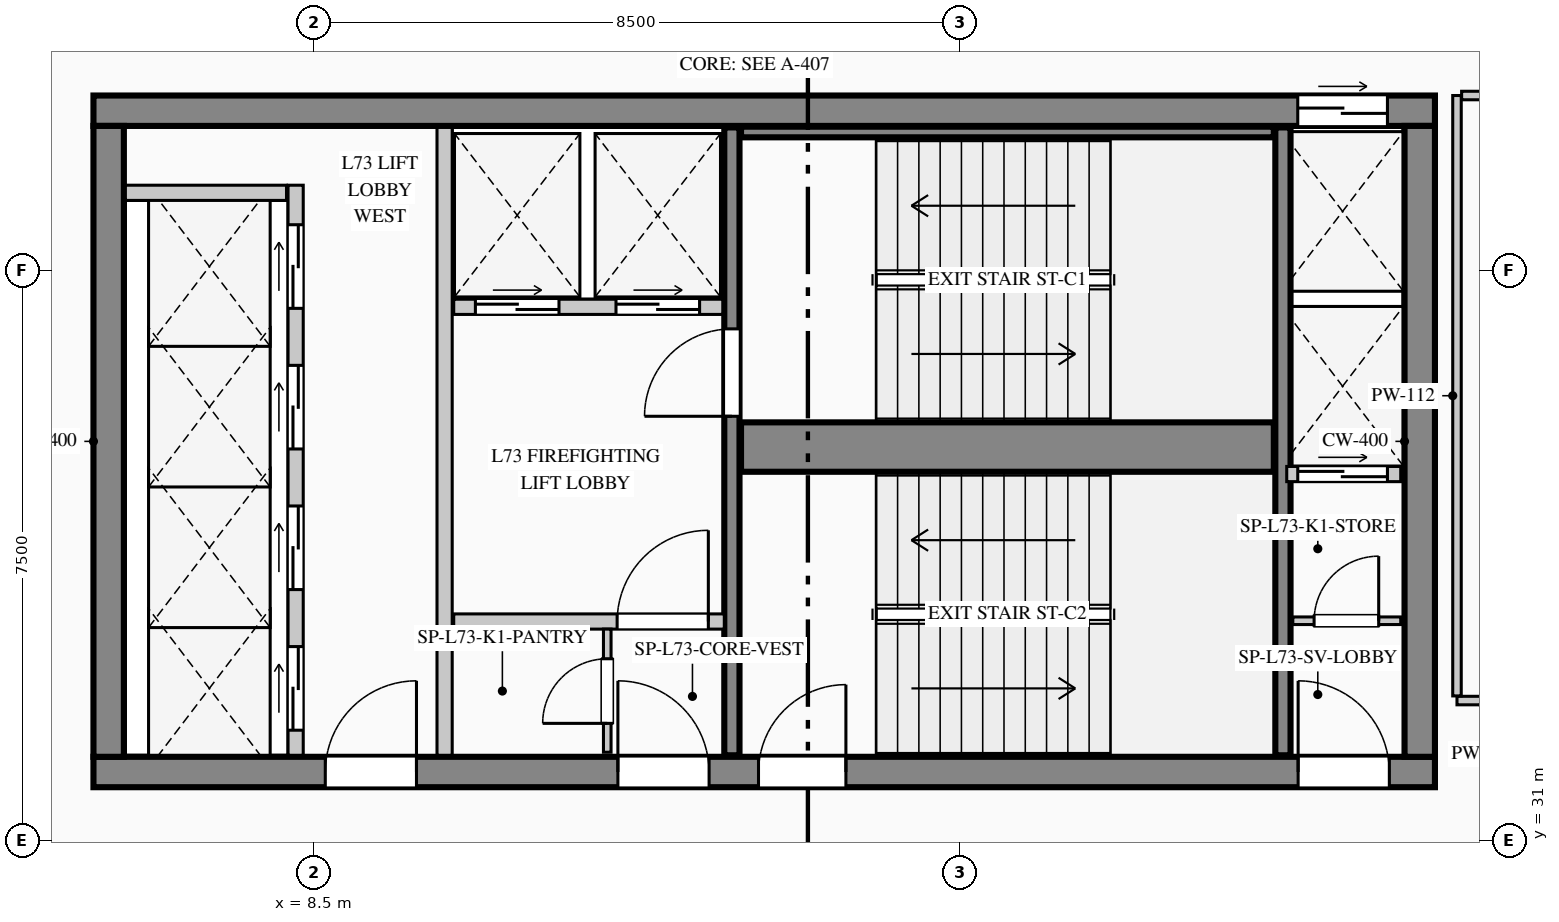
"""IFC4 building model, lengths in metres.
Left out: names, types, materials, properties, quantities, classifications, styles, units other than length and angle.
Written with IfcOpenShell. Run it as: python <this file> out.ifc"""

import sys

from ifc_helpers import new_model, si_unit, direction, frame, frame_2d, origin, place, context, subcontext, project, spatial, rectangle, extrude, element, fill, save


model = new_model("IFC4")
c1 = context("Model", 3, precision=1e-05, world=origin(), true_north=direction((0.0, 1.0)))
c2 = subcontext(c1, "Body", "Model", "MODEL_VIEW")
j1 = project(units=[si_unit("LENGTHUNIT", "METRE"), si_unit("PLANEANGLEUNIT", "RADIAN")], contexts=[c1])
p1 = place(None, origin())
s1 = spatial("IfcSite", under=j1, at=p1, CompositionType="ELEMENT")
p2 = place(p1, origin())
s2 = spatial("IfcBuilding", under=s1, at=p2, CompositionType="ELEMENT")
p3 = place(p2, frame((0.0, 0.0, 304.1)))
s3 = spatial("IfcBuildingStorey", under=s2, at=p3, CompositionType="ELEMENT", Elevation=304.1)
p4 = place(p3, frame((5.6, 40.6, 0.0), z_axis=(0.0, 0.0, 1.0), x_axis=(1.0, 0.0, 0.0)))
e1 = element("IfcWall", 1, at=p4, inside=s3, PredefinedType="SHEAR", context=c2, shape_type="SweptSolid", body=[
    extrude(rectangle(XDim=17.65, YDim=0.4, at=frame_2d((8.825, 0.0))), origin(), (0.0, 0.0, 1.0), 3.95),
])
p5 = place(p4, frame((15.845, 0.0, 0.0)))
e2 = element("IfcOpeningElement", 2, at=p5, cuts=e1, PredefinedType="OPENING", context=c2, shape_type="SweptSolid", body=[
    extrude(rectangle(XDim=1.18, YDim=2.25, at=frame_2d((0.59, 1.125))), frame((0.0, 0.21, 0.0), z_axis=(0.0, -1.0, 0.0), x_axis=(1.0, 0.0, 0.0)), (0.0, 0.0, 1.0), 0.42),
])
p6 = place(p3, frame((5.6, 31.9, 0.0), z_axis=(0.0, 0.0, 1.0), x_axis=(1.0, 0.0, 0.0)))
e3 = element("IfcWall", 3, at=p6, inside=s3, PredefinedType="SHEAR", context=c2, shape_type="SweptSolid", body=[
    extrude(rectangle(XDim=17.65, YDim=0.4, at=frame_2d((8.825, 0.0))), origin(), (0.0, 0.0, 1.0), 3.95),
])
p7 = place(p6, frame((3.05, 0.0, 0.0)))
e4 = element("IfcOpeningElement", 4, at=p7, cuts=e3, PredefinedType="OPENING", context=c2, shape_type="SweptSolid", body=[
    extrude(rectangle(XDim=1.2, YDim=2.2, at=frame_2d((0.6, 1.1))), frame((0.0, 0.21, 0.0), z_axis=(0.0, -1.0, 0.0), x_axis=(1.0, 0.0, 0.0)), (0.0, 0.0, 1.0), 0.42),
])
p8 = place(p6, frame((6.9, 0.0, 0.0)))
e5 = element("IfcOpeningElement", 5, at=p8, cuts=e3, PredefinedType="OPENING", context=c2, shape_type="SweptSolid", body=[
    extrude(rectangle(XDim=1.2, YDim=2.2, at=frame_2d((0.6, 1.1))), frame((0.0, 0.21, 0.0), z_axis=(0.0, -1.0, 0.0), x_axis=(1.0, 0.0, 0.0)), (0.0, 0.0, 1.0), 0.42),
])
p9 = place(p6, frame((8.75, 0.0, 0.0)))
e6 = element("IfcOpeningElement", 6, at=p9, cuts=e3, PredefinedType="OPENING", context=c2, shape_type="SweptSolid", body=[
    extrude(rectangle(XDim=1.15, YDim=2.2, at=frame_2d((0.575, 1.1))), frame((0.0, 0.21, 0.0), z_axis=(0.0, -1.0, 0.0), x_axis=(1.0, 0.0, 0.0)), (0.0, 0.0, 1.0), 0.42),
])
p10 = place(p6, frame((15.85, 0.0, 0.0)))
e7 = element("IfcOpeningElement", 7, at=p10, cuts=e3, PredefinedType="OPENING", context=c2, shape_type="SweptSolid", body=[
    extrude(rectangle(XDim=1.2, YDim=2.2, at=frame_2d((0.6, 1.1))), frame((0.0, 0.21, 0.0), z_axis=(0.0, -1.0, 0.0), x_axis=(1.0, 0.0, 0.0)), (0.0, 0.0, 1.0), 0.42),
])
for number, where, z_axis, x_axis in (
    (8, (5.8, 32.1, 0.0), (0.0, 0.0, 1.0), (0.0, 1.0, 0.0)),
    (9, (23.05, 32.1, 0.0), (0.0, 0.0, 1.0), (0.0, 1.0, 0.0)),
):
    element("IfcWall", number, at=place(p3, frame(where, z_axis=z_axis, x_axis=x_axis)), inside=s3, PredefinedType="SHEAR", context=c2, shape_type="SweptSolid", body=[
        extrude(rectangle(XDim=8.3, YDim=0.4, at=frame_2d((4.15, 0.0))), origin(), (0.0, 0.0, 1.0), 3.95),
    ])
p11 = place(p3, frame((14.0, 32.12, 0.0), z_axis=(0.0, 0.0, 1.0), x_axis=(0.0, 1.0, 0.0)))
e10 = element("IfcWall", 10, at=p11, inside=s3, PredefinedType="SHEAR", context=c2, shape_type="SweptSolid", body=[
    extrude(rectangle(XDim=8.26, YDim=0.2, at=frame_2d((4.13, 0.0))), origin(), (0.0, 0.0, 1.0), 3.95),
])
p12 = place(p11, frame((4.46, 0.0, 0.0)))
e11 = element("IfcOpeningElement", 11, at=p12, cuts=e10, PredefinedType="OPENING", context=c2, shape_type="SweptSolid", body=[
    extrude(rectangle(XDim=1.15, YDim=2.2, at=frame_2d((0.575, 1.1))), frame((0.0, 0.11, 0.0), z_axis=(0.0, -1.0, 0.0), x_axis=(1.0, 0.0, 0.0)), (0.0, 0.0, 1.0), 0.22),
])
p13 = place(p3, frame((14.12, 36.175, 0.0), z_axis=(0.0, 0.0, 1.0), x_axis=(1.0, 0.0, 0.0)))
e12 = element("IfcWall", 12, at=p13, inside=s3, PredefinedType="SHEAR", context=c2, shape_type="SweptSolid", body=[
    extrude(rectangle(XDim=7.01, YDim=0.65, at=frame_2d((3.505, 0.0))), origin(), (0.0, 0.0, 1.0), 3.95),
])
p14 = place(p3, frame((21.25, 32.12, 0.0), z_axis=(0.0, 0.0, 1.0), x_axis=(0.0, 1.0, 0.0)))
e13 = element("IfcWall", 13, at=p14, inside=s3, PredefinedType="SHEAR", context=c2, shape_type="SweptSolid", body=[
    extrude(rectangle(XDim=8.26, YDim=0.2, at=frame_2d((4.13, 0.0))), origin(), (0.0, 0.0, 1.0), 3.95),
])
p15 = place(p3, frame((14.12, 40.32, 0.0), z_axis=(0.0, 0.0, 1.0), x_axis=(1.0, 0.0, 0.0)))
e14 = element("IfcWall", 14, at=p15, inside=s3, PredefinedType="SHEAR", context=c2, shape_type="SweptSolid", body=[
    extrude(rectangle(XDim=7.01, YDim=0.14, at=frame_2d((3.505, 0.0))), origin(), (0.0, 0.0, 1.0), 3.95),
])
p16 = place(p3, frame((8.26, 32.12, 0.0), z_axis=(0.0, 0.0, 1.0), x_axis=(0.0, 1.0, 0.0)))
e15 = element("IfcWall", 15, at=p16, inside=s3, PredefinedType="PARTITIONING", context=c2, shape_type="SweptSolid", body=[
    extrude(rectangle(XDim=7.5, YDim=0.2, at=frame_2d((3.75, 0.0))), origin(), (0.0, 0.0, 1.0), 3.7),
])
p17 = place(p16, frame((0.33, 0.0, 0.0)))
e16 = element("IfcOpeningElement", 16, at=p17, cuts=e15, PredefinedType="OPENING", context=c2, shape_type="SweptSolid", body=[
    extrude(rectangle(XDim=1.1, YDim=2.2, at=frame_2d((0.55, 1.1))), frame((0.0, 0.11, 0.0), z_axis=(0.0, -1.0, 0.0), x_axis=(1.0, 0.0, 0.0)), (0.0, 0.0, 1.0), 0.22),
])
p18 = place(p16, frame((2.18, 0.0, 0.0)))
e17 = element("IfcOpeningElement", 17, at=p18, cuts=e15, PredefinedType="OPENING", context=c2, shape_type="SweptSolid", body=[
    extrude(rectangle(XDim=1.1, YDim=2.2, at=frame_2d((0.55, 1.1))), frame((0.0, 0.11, 0.0), z_axis=(0.0, -1.0, 0.0), x_axis=(1.0, 0.0, 0.0)), (0.0, 0.0, 1.0), 0.22),
])
p19 = place(p16, frame((4.03, 0.0, 0.0)))
e18 = element("IfcOpeningElement", 18, at=p19, cuts=e15, PredefinedType="OPENING", context=c2, shape_type="SweptSolid", body=[
    extrude(rectangle(XDim=1.1, YDim=2.2, at=frame_2d((0.55, 1.1))), frame((0.0, 0.11, 0.0), z_axis=(0.0, -1.0, 0.0), x_axis=(1.0, 0.0, 0.0)), (0.0, 0.0, 1.0), 0.22),
])
p20 = place(p16, frame((5.88, 0.0, 0.0)))
e19 = element("IfcOpeningElement", 19, at=p20, cuts=e15, PredefinedType="OPENING", context=c2, shape_type="SweptSolid", body=[
    extrude(rectangle(XDim=1.1, YDim=2.2, at=frame_2d((0.55, 1.1))), frame((0.0, 0.11, 0.0), z_axis=(0.0, -1.0, 0.0), x_axis=(1.0, 0.0, 0.0)), (0.0, 0.0, 1.0), 0.22),
])
p21 = place(p3, frame((6.02, 39.52, 0.0), z_axis=(0.0, 0.0, 1.0), x_axis=(1.0, 0.0, 0.0)))
e20 = element("IfcWall", 20, at=p21, inside=s3, PredefinedType="PARTITIONING", context=c2, shape_type="SweptSolid", body=[
    extrude(rectangle(XDim=2.12, YDim=0.2, at=frame_2d((1.06, 0.0))), origin(), (0.0, 0.0, 1.0), 3.7),
])
p22 = place(p3, frame((10.22, 32.12, 0.0), z_axis=(0.0, 0.0, 1.0), x_axis=(0.0, 1.0, 0.0)))
e21 = element("IfcWall", 21, at=p22, inside=s3, PredefinedType="PARTITIONING", context=c2, shape_type="SweptSolid", body=[
    extrude(rectangle(XDim=8.26, YDim=0.2, at=frame_2d((4.13, 0.0))), origin(), (0.0, 0.0, 1.0), 3.7),
])
p23 = place(p3, frame((10.34, 38.02, 0.0), z_axis=(0.0, 0.0, 1.0), x_axis=(1.0, 0.0, 0.0)))
e22 = element("IfcWall", 22, at=p23, inside=s3, PredefinedType="PARTITIONING", context=c2, shape_type="SweptSolid", body=[
    extrude(rectangle(XDim=3.54, YDim=0.2, at=frame_2d((1.77, 0.0))), origin(), (0.0, 0.0, 1.0), 3.7),
])
p24 = place(p23, frame((0.285, 0.0, 0.0)))
e23 = element("IfcOpeningElement", 23, at=p24, cuts=e22, PredefinedType="OPENING", context=c2, shape_type="SweptSolid", body=[
    extrude(rectangle(XDim=1.1, YDim=2.2, at=frame_2d((0.55, 1.1))), frame((0.0, 0.11, 0.0), z_axis=(0.0, -1.0, 0.0), x_axis=(1.0, 0.0, 0.0)), (0.0, 0.0, 1.0), 0.22),
])
p25 = place(p23, frame((2.135, 0.0, 0.0)))
e24 = element("IfcOpeningElement", 24, at=p25, cuts=e22, PredefinedType="OPENING", context=c2, shape_type="SweptSolid", body=[
    extrude(rectangle(XDim=1.1, YDim=2.2, at=frame_2d((0.55, 1.1))), frame((0.0, 0.11, 0.0), z_axis=(0.0, -1.0, 0.0), x_axis=(1.0, 0.0, 0.0)), (0.0, 0.0, 1.0), 0.22),
])
p26 = place(p3, frame((10.34, 33.88, 0.0), z_axis=(0.0, 0.0, 1.0), x_axis=(1.0, 0.0, 0.0)))
e25 = element("IfcWall", 25, at=p26, inside=s3, PredefinedType="PARTITIONING", context=c2, shape_type="SweptSolid", body=[
    extrude(rectangle(XDim=3.56, YDim=0.2, at=frame_2d((1.78, 0.0))), origin(), (0.0, 0.0, 1.0), 3.7),
])
p27 = place(p26, frame((2.15, 0.0, 0.0)))
e26 = element("IfcOpeningElement", 26, at=p27, cuts=e25, PredefinedType="OPENING", context=c2, shape_type="SweptSolid", body=[
    extrude(rectangle(XDim=1.2, YDim=2.2, at=frame_2d((0.6, 1.1))), frame((0.0, 0.11, 0.0), z_axis=(0.0, -1.0, 0.0), x_axis=(1.0, 0.0, 0.0)), (0.0, 0.0, 1.0), 0.22),
])
p28 = place(p3, frame((12.36, 32.16, 0.0), z_axis=(0.0, 0.0, 1.0), x_axis=(0.0, 1.0, 0.0)))
e27 = element("IfcWall", 27, at=p28, inside=s3, PredefinedType="PARTITIONING", context=c2, shape_type="SweptSolid", body=[
    extrude(rectangle(XDim=1.62, YDim=0.1, at=frame_2d((0.81, 0.0))), origin(), (0.0, 0.0, 1.0), 3.7),
])
p29 = place(p28, frame((0.38, 0.0, 0.0)))
e28 = element("IfcOpeningElement", 28, at=p29, cuts=e27, PredefinedType="OPENING", context=c2, shape_type="SweptSolid", body=[
    extrude(rectangle(XDim=0.85, YDim=2.1, at=frame_2d((0.425, 1.05))), frame((0.0, 0.06, 0.0), z_axis=(0.0, -1.0, 0.0), x_axis=(1.0, 0.0, 0.0)), (0.0, 0.0, 1.0), 0.12),
])
p30 = place(p3, frame((21.38, 33.89, 0.0), z_axis=(0.0, 0.0, 1.0), x_axis=(1.0, 0.0, 0.0)))
e29 = element("IfcWall", 29, at=p30, inside=s3, PredefinedType="PARTITIONING", context=c2, shape_type="SweptSolid", body=[
    extrude(rectangle(XDim=1.42, YDim=0.1, at=frame_2d((0.71, 0.0))), origin(), (0.0, 0.0, 1.0), 3.7),
])
p31 = place(p30, frame((0.28, 0.0, 0.0)))
e30 = element("IfcOpeningElement", 30, at=p31, cuts=e29, PredefinedType="OPENING", context=c2, shape_type="SweptSolid", body=[
    extrude(rectangle(XDim=0.85, YDim=2.1, at=frame_2d((0.425, 1.05))), frame((0.0, 0.06, 0.0), z_axis=(0.0, -1.0, 0.0), x_axis=(1.0, 0.0, 0.0)), (0.0, 0.0, 1.0), 0.12),
])
p32 = place(p3, frame((21.3, 35.82, 0.0), z_axis=(0.0, 0.0, 1.0), x_axis=(1.0, 0.0, 0.0)))
e31 = element("IfcWall", 31, at=p32, inside=s3, PredefinedType="PARTITIONING", context=c2, shape_type="SweptSolid", body=[
    extrude(rectangle(XDim=1.5, YDim=0.2, at=frame_2d((0.75, 0.0))), origin(), (0.0, 0.0, 1.0), 3.7),
])
p33 = place(p32, frame((0.145, 0.0, 0.0)))
e32 = element("IfcOpeningElement", 32, at=p33, cuts=e31, PredefinedType="OPENING", context=c2, shape_type="SweptSolid", body=[
    extrude(rectangle(XDim=1.18, YDim=2.25, at=frame_2d((0.59, 1.125))), frame((0.0, 0.11, 0.0), z_axis=(0.0, -1.0, 0.0), x_axis=(1.0, 0.0, 0.0)), (0.0, 0.0, 1.0), 0.22),
])
p34 = place(p3, frame((26.813, 32.84, 0.0), z_axis=(0.0, 0.0, 1.0), x_axis=(-1.0, 0.0, 0.0)))
e33 = element("IfcWall", 33, at=p34, inside=s3, PredefinedType="PARTITIONING", context=c2, shape_type="SweptSolid", body=[
    extrude(rectangle(XDim=3.273, YDim=0.112, at=frame_2d((1.636, 0.0))), origin(), (0.0, 0.0, 1.0), 3.7),
])
p35 = place(p34, frame((1.136, 0.0, 0.0)))
e34 = element("IfcOpeningElement", 34, at=p35, cuts=e33, PredefinedType="OPENING", context=c2, shape_type="SweptSolid", body=[
    extrude(rectangle(XDim=1.0, YDim=2.15, at=frame_2d((0.5, 1.075))), frame((0.0, 0.066, 0.0), z_axis=(0.0, -1.0, 0.0), x_axis=(1.0, 0.0, 0.0)), (0.0, 0.0, 1.0), 0.132),
])
p36 = place(p3, frame((23.54, 32.901, 0.0), z_axis=(0.0, 0.0, 1.0), x_axis=(0.0, 1.0, 0.0)))
e35 = element("IfcWall", 35, at=p36, inside=s3, PredefinedType="PARTITIONING", context=c2, shape_type="SweptSolid", body=[
    extrude(rectangle(XDim=7.899, YDim=0.112, at=frame_2d((3.95, 0.0))), origin(), (0.0, 0.0, 1.0), 3.7),
])
p37 = place(p3, frame((23.601, 40.8, 0.0), z_axis=(0.0, 0.0, 1.0), x_axis=(1.0, 0.0, 0.0)))
e36 = element("IfcWall", 36, at=p37, inside=s3, PredefinedType="PARTITIONING", context=c2, shape_type="SweptSolid", body=[
    extrude(rectangle(XDim=3.909, YDim=0.112, at=frame_2d((1.955, 0.0))), origin(), (0.0, 0.0, 1.0), 3.7),
])
p38 = place(p7, origin())
e37 = element("IfcDoor", 37, at=p38, inside=s3, OperationType="SINGLE_SWING_RIGHT", PredefinedType="DOOR", context=c2, shape_type="SweptSolid", body=[
    extrude(rectangle(XDim=1.2, YDim=2.2, at=frame_2d((0.6, 1.1))), frame((0.0, 0.025, 0.0), z_axis=(0.0, -1.0, 0.0), x_axis=(1.0, 0.0, 0.0)), (0.0, 0.0, 1.0), 0.05),
])
fill(e4, e37)
p39 = place(p8, origin())
e38 = element("IfcDoor", 38, at=p39, inside=s3, OperationType="SINGLE_SWING_LEFT", PredefinedType="DOOR", context=c2, shape_type="SweptSolid", body=[
    extrude(rectangle(XDim=1.2, YDim=2.2, at=frame_2d((0.6, 1.1))), frame((0.0, 0.025, 0.0), z_axis=(0.0, -1.0, 0.0), x_axis=(1.0, 0.0, 0.0)), (0.0, 0.0, 1.0), 0.05),
])
fill(e5, e38)
p40 = place(p9, origin())
e39 = element("IfcDoor", 39, at=p40, inside=s3, OperationType="SINGLE_SWING_RIGHT", PredefinedType="DOOR", context=c2, shape_type="SweptSolid", body=[
    extrude(rectangle(XDim=1.15, YDim=2.2, at=frame_2d((0.575, 1.1))), frame((0.0, 0.025, 0.0), z_axis=(0.0, -1.0, 0.0), x_axis=(1.0, 0.0, 0.0)), (0.0, 0.0, 1.0), 0.05),
])
fill(e6, e39)
p41 = place(p10, origin())
e40 = element("IfcDoor", 40, at=p41, inside=s3, OperationType="SINGLE_SWING_LEFT", PredefinedType="DOOR", context=c2, shape_type="SweptSolid", body=[
    extrude(rectangle(XDim=1.2, YDim=2.2, at=frame_2d((0.6, 1.1))), frame((0.0, 0.025, 0.0), z_axis=(0.0, -1.0, 0.0), x_axis=(1.0, 0.0, 0.0)), (0.0, 0.0, 1.0), 0.05),
])
fill(e7, e40)
p42 = place(p27, origin())
e41 = element("IfcDoor", 41, at=p42, inside=s3, OperationType="SINGLE_SWING_RIGHT", PredefinedType="DOOR", context=c2, shape_type="SweptSolid", body=[
    extrude(rectangle(XDim=1.2, YDim=2.2, at=frame_2d((0.6, 1.1))), frame((0.0, 0.025, 0.0), z_axis=(0.0, -1.0, 0.0), x_axis=(1.0, 0.0, 0.0)), (0.0, 0.0, 1.0), 0.05),
])
fill(e26, e41)
p43 = place(p29, origin())
e42 = element("IfcDoor", 42, at=p43, inside=s3, OperationType="SINGLE_SWING_LEFT", PredefinedType="DOOR", context=c2, shape_type="SweptSolid", body=[
    extrude(rectangle(XDim=0.85, YDim=2.1, at=frame_2d((0.425, 1.05))), frame((0.0, 0.025, 0.0), z_axis=(0.0, -1.0, 0.0), x_axis=(1.0, 0.0, 0.0)), (0.0, 0.0, 1.0), 0.05),
])
fill(e28, e42)
p44 = place(p31, origin())
e43 = element("IfcDoor", 43, at=p44, inside=s3, OperationType="SINGLE_SWING_RIGHT", PredefinedType="DOOR", context=c2, shape_type="SweptSolid", body=[
    extrude(rectangle(XDim=0.85, YDim=2.1, at=frame_2d((0.425, 1.05))), frame((0.0, 0.025, 0.0), z_axis=(0.0, -1.0, 0.0), x_axis=(1.0, 0.0, 0.0)), (0.0, 0.0, 1.0), 0.05),
])
fill(e30, e43)
p45 = place(p12, origin())
e44 = element("IfcDoor", 44, at=p45, inside=s3, OperationType="SINGLE_SWING_LEFT", PredefinedType="DOOR", context=c2, shape_type="SweptSolid", body=[
    extrude(rectangle(XDim=1.15, YDim=2.2, at=frame_2d((0.575, 1.1))), frame((0.0, 0.025, 0.0), z_axis=(0.0, -1.0, 0.0), x_axis=(1.0, 0.0, 0.0)), (0.0, 0.0, 1.0), 0.05),
])
fill(e11, e44)
p46 = place(p17, origin())
e45 = element("IfcDoor", 45, at=p46, inside=s3, OperationType="DOUBLE_DOOR_SLIDING", PredefinedType="DOOR", context=c2, shape_type="SweptSolid", body=[
    extrude(rectangle(XDim=1.1, YDim=2.2, at=frame_2d((0.55, 1.1))), frame((0.0, 0.025, 0.0), z_axis=(0.0, -1.0, 0.0), x_axis=(1.0, 0.0, 0.0)), (0.0, 0.0, 1.0), 0.05),
])
fill(e16, e45)
p47 = place(p18, origin())
e46 = element("IfcDoor", 46, at=p47, inside=s3, OperationType="DOUBLE_DOOR_SLIDING", PredefinedType="DOOR", context=c2, shape_type="SweptSolid", body=[
    extrude(rectangle(XDim=1.1, YDim=2.2, at=frame_2d((0.55, 1.1))), frame((0.0, 0.025, 0.0), z_axis=(0.0, -1.0, 0.0), x_axis=(1.0, 0.0, 0.0)), (0.0, 0.0, 1.0), 0.05),
])
fill(e17, e46)
p48 = place(p19, origin())
e47 = element("IfcDoor", 47, at=p48, inside=s3, OperationType="DOUBLE_DOOR_SLIDING", PredefinedType="DOOR", context=c2, shape_type="SweptSolid", body=[
    extrude(rectangle(XDim=1.1, YDim=2.2, at=frame_2d((0.55, 1.1))), frame((0.0, 0.025, 0.0), z_axis=(0.0, -1.0, 0.0), x_axis=(1.0, 0.0, 0.0)), (0.0, 0.0, 1.0), 0.05),
])
fill(e18, e47)
p49 = place(p20, origin())
e48 = element("IfcDoor", 48, at=p49, inside=s3, OperationType="DOUBLE_DOOR_SLIDING", PredefinedType="DOOR", context=c2, shape_type="SweptSolid", body=[
    extrude(rectangle(XDim=1.1, YDim=2.2, at=frame_2d((0.55, 1.1))), frame((0.0, 0.025, 0.0), z_axis=(0.0, -1.0, 0.0), x_axis=(1.0, 0.0, 0.0)), (0.0, 0.0, 1.0), 0.05),
])
fill(e19, e48)
p50 = place(p24, origin())
e49 = element("IfcDoor", 49, at=p50, inside=s3, OperationType="DOUBLE_DOOR_SLIDING", PredefinedType="DOOR", context=c2, shape_type="SweptSolid", body=[
    extrude(rectangle(XDim=1.1, YDim=2.2, at=frame_2d((0.55, 1.1))), frame((0.0, 0.025, 0.0), z_axis=(0.0, -1.0, 0.0), x_axis=(1.0, 0.0, 0.0)), (0.0, 0.0, 1.0), 0.05),
])
fill(e23, e49)
p51 = place(p25, origin())
e50 = element("IfcDoor", 50, at=p51, inside=s3, OperationType="DOUBLE_DOOR_SLIDING", PredefinedType="DOOR", context=c2, shape_type="SweptSolid", body=[
    extrude(rectangle(XDim=1.1, YDim=2.2, at=frame_2d((0.55, 1.1))), frame((0.0, 0.025, 0.0), z_axis=(0.0, -1.0, 0.0), x_axis=(1.0, 0.0, 0.0)), (0.0, 0.0, 1.0), 0.05),
])
fill(e24, e50)
p52 = place(p5, origin())
e51 = element("IfcDoor", 51, at=p52, inside=s3, OperationType="DOUBLE_DOOR_SLIDING", PredefinedType="DOOR", context=c2, shape_type="SweptSolid", body=[
    extrude(rectangle(XDim=1.18, YDim=2.25, at=frame_2d((0.59, 1.125))), frame((0.0, 0.025, 0.0), z_axis=(0.0, -1.0, 0.0), x_axis=(1.0, 0.0, 0.0)), (0.0, 0.0, 1.0), 0.05),
])
fill(e2, e51)
p53 = place(p33, origin())
e52 = element("IfcDoor", 52, at=p53, inside=s3, OperationType="DOUBLE_DOOR_SLIDING", PredefinedType="DOOR", context=c2, shape_type="SweptSolid", body=[
    extrude(rectangle(XDim=1.18, YDim=2.25, at=frame_2d((0.59, 1.125))), frame((0.0, 0.025, 0.0), z_axis=(0.0, -1.0, 0.0), x_axis=(1.0, 0.0, 0.0)), (0.0, 0.0, 1.0), 0.05),
])
fill(e32, e52)
save(model, sys.argv[1])
